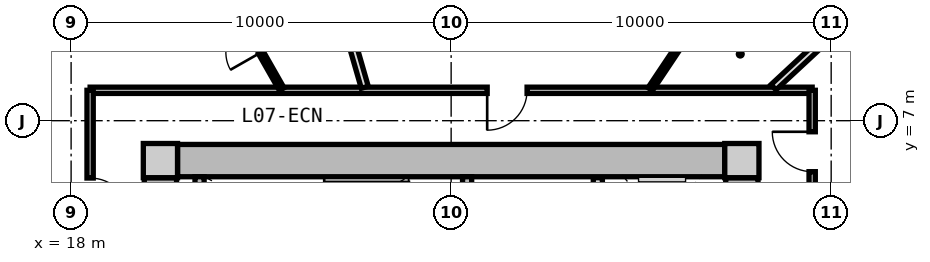
"""IFC4 building model, lengths in metres.
Left out: names, types, materials, properties, quantities, classifications, styles, units other than length and angle.
Written with IfcOpenShell. Run it as: python <this file> out.ifc"""

import sys

from ifc_helpers import new_model, si_unit, direction, frame, frame_2d, origin, origin_2d, place, context, subcontext, project, spatial, rectangle, extrude, source, transform, mapped, element, fill, save


model = new_model("IFC4")
c1 = context("Model", 3, precision=1e-05, world=origin(), true_north=direction((0.0, 1.0)))
c2 = subcontext(c1, "Body", "Model", "MODEL_VIEW")
j1 = project(units=[si_unit("LENGTHUNIT", "METRE"), si_unit("PLANEANGLEUNIT", "RADIAN")], contexts=[c1])
p1 = place(None, origin())
s1 = spatial("IfcSite", under=j1, at=p1, CompositionType="ELEMENT")
p2 = place(p1, origin())
s2 = spatial("IfcBuilding", under=s1, at=p2, CompositionType="ELEMENT")
p3 = place(p2, frame((0.0, 0.0, 27.7)))
s3 = spatial("IfcBuildingStorey", under=s2, at=p3, CompositionType="ELEMENT", Elevation=27.7)
m1 = source(origin(), c2, "Body", "SweptSolid", [
    extrude(rectangle(XDim=0.9, YDim=0.9, at=origin_2d()), origin(), (0.0, 0.0, 1.0), 3.05),
])
for number, where, z_axis, x_axis in (
    (1, (35.65, 5.95, 0.0), (0.0, 0.0, 1.0), (1.0, 0.0, 0.0)),
    (2, (20.35, 5.95, 0.0), (0.0, 0.0, 1.0), (1.0, 0.0, 0.0)),
):
    element("IfcColumn", number, at=place(p3, frame(where, z_axis=z_axis, x_axis=x_axis)), inside=s3, PredefinedType="COLUMN", context=c2, shape_type="MappedRepresentation", body=[
        mapped(m1, transform((0.0, 0.0, 0.0), x_axis=(1.0, 0.0, 0.0), y_axis=(0.0, 1.0, 0.0), z_axis=(0.0, 0.0, 1.0), scale=1.0)),
    ])
m2 = source(origin(), c2, "Body", "SweptSolid", [
    extrude(rectangle(XDim=14.4, YDim=0.85, at=frame_2d((7.2, 0.0))), origin(), (0.0, 0.0, 1.0), 2.79),
])
p4 = place(p3, frame((20.8, 5.95, 0.0), z_axis=(0.0, 0.0, 1.0), x_axis=(1.0, 0.0, 0.0)))
e3 = element("IfcWall", 3, at=p4, inside=s3, PredefinedType="SHEAR", context=c2, shape_type="MappedRepresentation", body=[
    mapped(m2, transform((0.0, 0.0, 0.0), x_axis=(1.0, 0.0, 0.0), y_axis=(0.0, 1.0, 0.0), z_axis=(0.0, 0.0, 1.0), scale=1.0)),
])
m3 = source(origin(), c2, "Body", "SweptSolid", [
    extrude(rectangle(XDim=11.0, YDim=0.85, at=frame_2d((5.5, 0.0))), origin(), (0.0, 0.0, 1.0), 2.79),
])
p5 = place(p3, frame((20.35, -5.5, 0.0), z_axis=(0.0, 0.0, 1.0), x_axis=(0.0, 1.0, 0.0)))
e4 = element("IfcWall", 4, at=p5, inside=s3, PredefinedType="SHEAR", context=c2, shape_type="MappedRepresentation", body=[
    mapped(m3, transform((0.0, 0.0, 0.0), x_axis=(1.0, 0.0, 0.0), y_axis=(0.0, 1.0, 0.0), z_axis=(0.0, 0.0, 1.0), scale=1.0)),
])
p6 = place(p5, frame((3.8, 0.0, 0.0)))
e5 = element("IfcOpeningElement", 5, at=p6, cuts=e4, PredefinedType="OPENING", context=c2, shape_type="SweptSolid", body=[
    extrude(rectangle(XDim=1.2, YDim=2.15, at=frame_2d((0.6, 1.075))), frame((0.0, 0.435, 0.0), z_axis=(0.0, -1.0, 0.0), x_axis=(1.0, 0.0, 0.0)), (0.0, 0.0, 1.0), 0.87),
])
p7 = place(p3, frame((35.65, 5.5, 0.0), z_axis=(0.0, 0.0, 1.0), x_axis=(0.0, -1.0, 0.0)))
e6 = element("IfcWall", 6, at=p7, inside=s3, PredefinedType="SHEAR", context=c2, shape_type="MappedRepresentation", body=[
    mapped(m3, transform((0.0, 0.0, 0.0), x_axis=(1.0, 0.0, 0.0), y_axis=(0.0, 1.0, 0.0), z_axis=(0.0, 0.0, 1.0), scale=1.0)),
])
p8 = place(p7, frame((5.65, 0.0, 0.0)))
e7 = element("IfcOpeningElement", 7, at=p8, cuts=e6, PredefinedType="OPENING", context=c2, shape_type="SweptSolid", body=[
    extrude(rectangle(XDim=1.2, YDim=2.15, at=frame_2d((0.6, 1.075))), frame((0.0, 0.435, 0.0), z_axis=(0.0, -1.0, 0.0), x_axis=(1.0, 0.0, 0.0)), (0.0, 0.0, 1.0), 0.87),
])
m4 = source(origin(), c2, "Body", "SweptSolid", [
    extrude(rectangle(XDim=3.075, YDim=0.24, at=frame_2d((1.538, 0.0))), origin(), (0.0, 0.0, 1.0), 2.79),
])
p9 = place(p3, frame((21.38, 2.45, 0.0), z_axis=(0.0, 0.0, 1.0), x_axis=(0.0, 1.0, 0.0)))
e8 = element("IfcWall", 8, at=p9, inside=s3, PredefinedType="PARTITIONING", context=c2, shape_type="MappedRepresentation", body=[
    mapped(m4, transform((0.0, 0.0, 0.0), x_axis=(1.0, 0.0, 0.0), y_axis=(0.0, 1.0, 0.0), z_axis=(0.0, 0.0, 1.0), scale=1.0)),
])
p10 = place(p3, frame((28.42, 2.45, 0.0), z_axis=(0.0, 0.0, 1.0), x_axis=(0.0, 1.0, 0.0)))
e9 = element("IfcWall", 9, at=p10, inside=s3, PredefinedType="PARTITIONING", context=c2, shape_type="MappedRepresentation", body=[
    mapped(m4, transform((0.0, 0.0, 0.0), x_axis=(1.0, 0.0, 0.0), y_axis=(0.0, 1.0, 0.0), z_axis=(0.0, 0.0, 1.0), scale=1.0)),
])
p11 = place(p10, frame((0.55, 0.0, 0.0)))
e10 = element("IfcOpeningElement", 10, at=p11, cuts=e9, PredefinedType="OPENING", context=c2, shape_type="SweptSolid", body=[
    extrude(rectangle(XDim=1.1, YDim=2.15, at=frame_2d((0.55, 1.075))), frame((0.0, 0.13, 0.0), z_axis=(0.0, -1.0, 0.0), x_axis=(1.0, 0.0, 0.0)), (0.0, 0.0, 1.0), 0.26),
])
m5 = source(origin(), c2, "Body", "SweptSolid", [
    extrude(rectangle(XDim=5.0, YDim=0.24, at=frame_2d((2.5, 0.0))), origin(), (0.0, 0.0, 1.0), 2.775),
])
p12 = place(p3, frame((31.86, 0.5, 0.0), z_axis=(0.0, 0.0, 1.0), x_axis=(0.0, 1.0, 0.0)))
e11 = element("IfcWall", 11, at=p12, inside=s3, PredefinedType="PARTITIONING", context=c2, shape_type="MappedRepresentation", body=[
    mapped(m5, transform((0.0, 0.0, 0.0), x_axis=(1.0, 0.0, 0.0), y_axis=(0.0, 1.0, 0.0), z_axis=(0.0, 0.0, 1.0), scale=1.0)),
])
p13 = place(p12, frame((3.05, 0.0, 0.0)))
e12 = element("IfcOpeningElement", 12, at=p13, cuts=e11, PredefinedType="OPENING", context=c2, shape_type="SweptSolid", body=[
    extrude(rectangle(XDim=1.3, YDim=2.2, at=frame_2d((0.65, 1.1))), frame((0.0, 0.13, 0.0), z_axis=(0.0, -1.0, 0.0), x_axis=(1.0, 0.0, 0.0)), (0.0, 0.0, 1.0), 0.26),
])
p14 = place(p12, frame((0.55, 0.0, 0.0)))
e13 = element("IfcOpeningElement", 13, at=p14, cuts=e11, PredefinedType="OPENING", context=c2, shape_type="SweptSolid", body=[
    extrude(rectangle(XDim=1.3, YDim=2.2, at=frame_2d((0.65, 1.1))), frame((0.0, 0.13, 0.0), z_axis=(0.0, -1.0, 0.0), x_axis=(1.0, 0.0, 0.0)), (0.0, 0.0, 1.0), 0.26),
])
m6 = source(origin(), c2, "Body", "SweptSolid", [
    extrude(rectangle(XDim=19.0, YDim=0.165, at=frame_2d((9.5, 0.0))), origin(), (0.0, 0.0, 1.0), 2.775),
])
p15 = place(p3, frame((18.5, 7.8, 0.0), z_axis=(0.0, 0.0, 1.0), x_axis=(1.0, 0.0, 0.0)))
e14 = element("IfcWall", 14, at=p15, inside=s3, PredefinedType="PARTITIONING", context=c2, shape_type="MappedRepresentation", body=[
    mapped(m6, transform((0.0, 0.0, 0.0), x_axis=(1.0, 0.0, 0.0), y_axis=(0.0, 1.0, 0.0), z_axis=(0.0, 0.0, 1.0), scale=1.0)),
])
p16 = place(p15, frame((10.448, 0.0, 0.0)))
e15 = element("IfcOpeningElement", 15, at=p16, cuts=e14, PredefinedType="OPENING", context=c2, shape_type="SweptSolid", body=[
    extrude(rectangle(XDim=1.05, YDim=2.15, at=frame_2d((0.525, 1.075))), frame((0.0, 0.093, 0.0), z_axis=(0.0, -1.0, 0.0), x_axis=(1.0, 0.0, 0.0)), (0.0, 0.0, 1.0), 0.185),
])
m7 = source(origin(), c2, "Body", "SweptSolid", [
    extrude(rectangle(XDim=15.6, YDim=0.165, at=frame_2d((7.8, 0.0))), origin(), (0.0, 0.0, 1.0), 2.775),
])
p17 = place(p3, frame((18.5, -7.8, 0.0), z_axis=(0.0, 0.0, 1.0), x_axis=(0.0, 1.0, 0.0)))
e16 = element("IfcWall", 16, at=p17, inside=s3, PredefinedType="PARTITIONING", context=c2, shape_type="MappedRepresentation", body=[
    mapped(m7, transform((0.0, 0.0, 0.0), x_axis=(1.0, 0.0, 0.0), y_axis=(0.0, 1.0, 0.0), z_axis=(0.0, 0.0, 1.0), scale=1.0)),
])
p18 = place(p17, frame((12.241, 0.0, 0.0)))
e17 = element("IfcOpeningElement", 17, at=p18, cuts=e16, PredefinedType="OPENING", context=c2, shape_type="SweptSolid", body=[
    extrude(rectangle(XDim=1.05, YDim=2.15, at=frame_2d((0.525, 1.075))), frame((0.0, 0.093, 0.0), z_axis=(0.0, -1.0, 0.0), x_axis=(1.0, 0.0, 0.0)), (0.0, 0.0, 1.0), 0.185),
])
p19 = place(p17, frame((3.63, 0.0, 0.0)))
e18 = element("IfcOpeningElement", 18, at=p19, cuts=e16, PredefinedType="OPENING", context=c2, shape_type="SweptSolid", body=[
    extrude(rectangle(XDim=1.05, YDim=2.15, at=frame_2d((0.525, 1.075))), frame((0.0, 0.093, 0.0), z_axis=(0.0, -1.0, 0.0), x_axis=(1.0, 0.0, 0.0)), (0.0, 0.0, 1.0), 0.185),
])
p20 = place(p3, frame((37.5, 7.8, 0.0), z_axis=(0.0, 0.0, 1.0), x_axis=(0.0, -1.0, 0.0)))
e19 = element("IfcWall", 19, at=p20, inside=s3, PredefinedType="PARTITIONING", context=c2, shape_type="MappedRepresentation", body=[
    mapped(m7, transform((0.0, 0.0, 0.0), x_axis=(1.0, 0.0, 0.0), y_axis=(0.0, 1.0, 0.0), z_axis=(0.0, 0.0, 1.0), scale=1.0)),
])
p21 = place(p20, frame((12.141, 0.0, 0.0)))
e20 = element("IfcOpeningElement", 20, at=p21, cuts=e19, PredefinedType="OPENING", context=c2, shape_type="SweptSolid", body=[
    extrude(rectangle(XDim=1.25, YDim=2.2, at=frame_2d((0.625, 1.1))), frame((0.0, 0.093, 0.0), z_axis=(0.0, -1.0, 0.0), x_axis=(1.0, 0.0, 0.0)), (0.0, 0.0, 1.0), 0.185),
])
p22 = place(p20, frame((6.196, 0.0, 0.0)))
e21 = element("IfcOpeningElement", 21, at=p22, cuts=e19, PredefinedType="OPENING", context=c2, shape_type="SweptSolid", body=[
    extrude(rectangle(XDim=1.05, YDim=2.15, at=frame_2d((0.525, 1.075))), frame((0.0, 0.093, 0.0), z_axis=(0.0, -1.0, 0.0), x_axis=(1.0, 0.0, 0.0)), (0.0, 0.0, 1.0), 0.185),
])
p23 = place(p20, frame((1.092, 0.0, 0.0)))
e22 = element("IfcOpeningElement", 22, at=p23, cuts=e19, PredefinedType="OPENING", context=c2, shape_type="SweptSolid", body=[
    extrude(rectangle(XDim=1.05, YDim=2.15, at=frame_2d((0.525, 1.075))), frame((0.0, 0.093, 0.0), z_axis=(0.0, -1.0, 0.0), x_axis=(1.0, 0.0, 0.0)), (0.0, 0.0, 1.0), 0.185),
])
m8 = source(origin(), c2, "Body", "SweptSolid", [
    extrude(rectangle(XDim=7.435, YDim=0.19, at=frame_2d((3.717, 0.0))), origin(), (0.0, 0.0, 1.0), 2.225),
])
p24 = place(p3, frame((36.483, 7.88, 0.0), z_axis=(0.0, 0.0, 1.0), x_axis=(0.732651956848, 0.680603489652, 0.0)))
e23 = element("IfcWall", 23, at=p24, inside=s3, PredefinedType="PARTITIONING", context=c2, shape_type="MappedRepresentation", body=[
    mapped(m8, transform((0.0, 0.0, 0.0), x_axis=(1.0, 0.0, 0.0), y_axis=(0.0, 1.0, 0.0), z_axis=(0.0, 0.0, 1.0), scale=1.0)),
])
m9 = source(origin(), c2, "Body", "SweptSolid", [
    extrude(rectangle(XDim=10.196, YDim=0.19, at=frame_2d((5.098, 0.0))), origin(), (0.0, 0.0, 1.0), 2.225),
])
p25 = place(p3, frame((25.727, 7.88, 0.0), z_axis=(0.0, 0.0, 1.0), x_axis=(-0.277136420347, 0.960830580549, 0.0)))
e24 = element("IfcWall", 24, at=p25, inside=s3, PredefinedType="PARTITIONING", context=c2, shape_type="MappedRepresentation", body=[
    mapped(m9, transform((0.0, 0.0, 0.0), x_axis=(1.0, 0.0, 0.0), y_axis=(0.0, 1.0, 0.0), z_axis=(0.0, 0.0, 1.0), scale=1.0)),
])
m10 = source(origin(), c2, "Body", "SweptSolid", [
    extrude(rectangle(XDim=3.025, YDim=0.14, at=frame_2d((1.513, 0.0))), origin(), (0.0, 0.0, 1.0), 2.775),
])
p26 = place(p3, frame((33.24, 7.83, 0.0), z_axis=(0.0, 0.0, 1.0), x_axis=(0.556189165904, 0.831055721195, 0.0)))
e25 = element("IfcWall", 25, at=p26, inside=s3, PredefinedType="PARTITIONING", context=c2, shape_type="MappedRepresentation", body=[
    mapped(m10, transform((0.0, 0.0, 0.0), x_axis=(1.0, 0.0, 0.0), y_axis=(0.0, 1.0, 0.0), z_axis=(0.0, 0.0, 1.0), scale=1.0)),
])
m11 = source(origin(), c2, "Body", "SweptSolid", [
    extrude(rectangle(XDim=3.141, YDim=0.14, at=frame_2d((1.571, 0.0))), origin(), (0.0, 0.0, 1.0), 2.775),
])
p27 = place(p3, frame((23.542, 7.83, 0.0), z_axis=(0.0, 0.0, 1.0), x_axis=(-0.494874486088, 0.868964465913, 0.0)))
e26 = element("IfcWall", 26, at=p27, inside=s3, PredefinedType="PARTITIONING", context=c2, shape_type="MappedRepresentation", body=[
    mapped(m11, transform((0.0, 0.0, 0.0), x_axis=(1.0, 0.0, 0.0), y_axis=(0.0, 1.0, 0.0), z_axis=(0.0, 0.0, 1.0), scale=1.0)),
])
p28 = place(p27, frame((1.111, 0.0, 0.0)))
e27 = element("IfcOpeningElement", 27, at=p28, cuts=e26, PredefinedType="OPENING", context=c2, shape_type="SweptSolid", body=[
    extrude(rectangle(XDim=0.92, YDim=2.1, at=frame_2d((0.46, 1.05))), frame((0.0, 0.08, 0.0), z_axis=(0.0, -1.0, 0.0), x_axis=(1.0, 0.0, 0.0)), (0.0, 0.0, 1.0), 0.16),
])
m12 = source(origin(), c2, "Body", "SweptSolid", [
    extrude(rectangle(XDim=4.374, YDim=0.14, at=frame_2d((2.187, 0.0))), origin(), (0.0, 0.0, 1.0), 2.775),
])
p29 = place(p3, frame((37.53, 4.732, 0.0), z_axis=(0.0, 0.0, 1.0), x_axis=(0.89568523908, 0.444688601714, 0.0)))
e28 = element("IfcWall", 28, at=p29, inside=s3, PredefinedType="PARTITIONING", context=c2, shape_type="MappedRepresentation", body=[
    mapped(m12, transform((0.0, 0.0, 0.0), x_axis=(1.0, 0.0, 0.0), y_axis=(0.0, 1.0, 0.0), z_axis=(0.0, 0.0, 1.0), scale=1.0)),
])
p30 = place(p29, frame((1.727, 0.0, 0.0)))
e29 = element("IfcOpeningElement", 29, at=p30, cuts=e28, PredefinedType="OPENING", context=c2, shape_type="SweptSolid", body=[
    extrude(rectangle(XDim=0.92, YDim=2.1, at=frame_2d((0.46, 1.05))), frame((0.0, 0.08, 0.0), z_axis=(0.0, -1.0, 0.0), x_axis=(1.0, 0.0, 0.0)), (0.0, 0.0, 1.0), 0.16),
])
m13 = source(origin(), c2, "Body", "SweptSolid", [
    extrude(rectangle(XDim=1.05, YDim=2.15, at=frame_2d((0.525, 1.075))), frame((0.0, 0.025, 0.0), z_axis=(0.0, -1.0, 0.0), x_axis=(1.0, 0.0, 0.0)), (0.0, 0.0, 1.0), 0.05),
])
p31 = place(p16, frame((1.05, 0.0, 0.0), z_axis=(0.0, 0.0, 1.0), x_axis=(-1.0, 0.0, 0.0)))
e30 = element("IfcDoor", 30, at=p31, inside=s3, OperationType="SINGLE_SWING_RIGHT", PredefinedType="DOOR", context=c2, shape_type="MappedRepresentation", body=[
    mapped(m13, transform((0.0, 0.0, 0.0), x_axis=(1.0, 0.0, 0.0), y_axis=(0.0, 1.0, 0.0), z_axis=(0.0, 0.0, 1.0), scale=1.0)),
])
fill(e15, e30)
p32 = place(p18, frame((1.05, 0.0, 0.0), z_axis=(0.0, 0.0, 1.0), x_axis=(-1.0, 0.0, 0.0)))
e31 = element("IfcDoor", 31, at=p32, inside=s3, OperationType="SINGLE_SWING_RIGHT", PredefinedType="DOOR", context=c2, shape_type="MappedRepresentation", body=[
    mapped(m13, transform((0.0, 0.0, 0.0), x_axis=(1.0, 0.0, 0.0), y_axis=(0.0, 1.0, 0.0), z_axis=(0.0, 0.0, 1.0), scale=1.0)),
])
fill(e17, e31)
m14 = source(origin(), c2, "Body", "SweptSolid", [
    extrude(rectangle(XDim=0.92, YDim=2.1, at=frame_2d((0.46, 1.05))), frame((0.0, 0.025, 0.0), z_axis=(0.0, -1.0, 0.0), x_axis=(1.0, 0.0, 0.0)), (0.0, 0.0, 1.0), 0.05),
])
p33 = place(p28, origin())
e32 = element("IfcDoor", 32, at=p33, inside=s3, OperationType="SINGLE_SWING_LEFT", PredefinedType="DOOR", context=c2, shape_type="MappedRepresentation", body=[
    mapped(m14, transform((0.0, 0.0, 0.0), x_axis=(1.0, 0.0, 0.0), y_axis=(0.0, 1.0, 0.0), z_axis=(0.0, 0.0, 1.0), scale=1.0)),
])
fill(e27, e32)
p34 = place(p23, frame((1.05, 0.0, 0.0), z_axis=(0.0, 0.0, 1.0), x_axis=(-1.0, 0.0, 0.0)))
e33 = element("IfcDoor", 33, at=p34, inside=s3, OperationType="SINGLE_SWING_RIGHT", PredefinedType="DOOR", context=c2, shape_type="MappedRepresentation", body=[
    mapped(m13, transform((0.0, 0.0, 0.0), x_axis=(1.0, 0.0, 0.0), y_axis=(0.0, 1.0, 0.0), z_axis=(0.0, 0.0, 1.0), scale=1.0)),
])
fill(e22, e33)
save(model, sys.argv[1])
